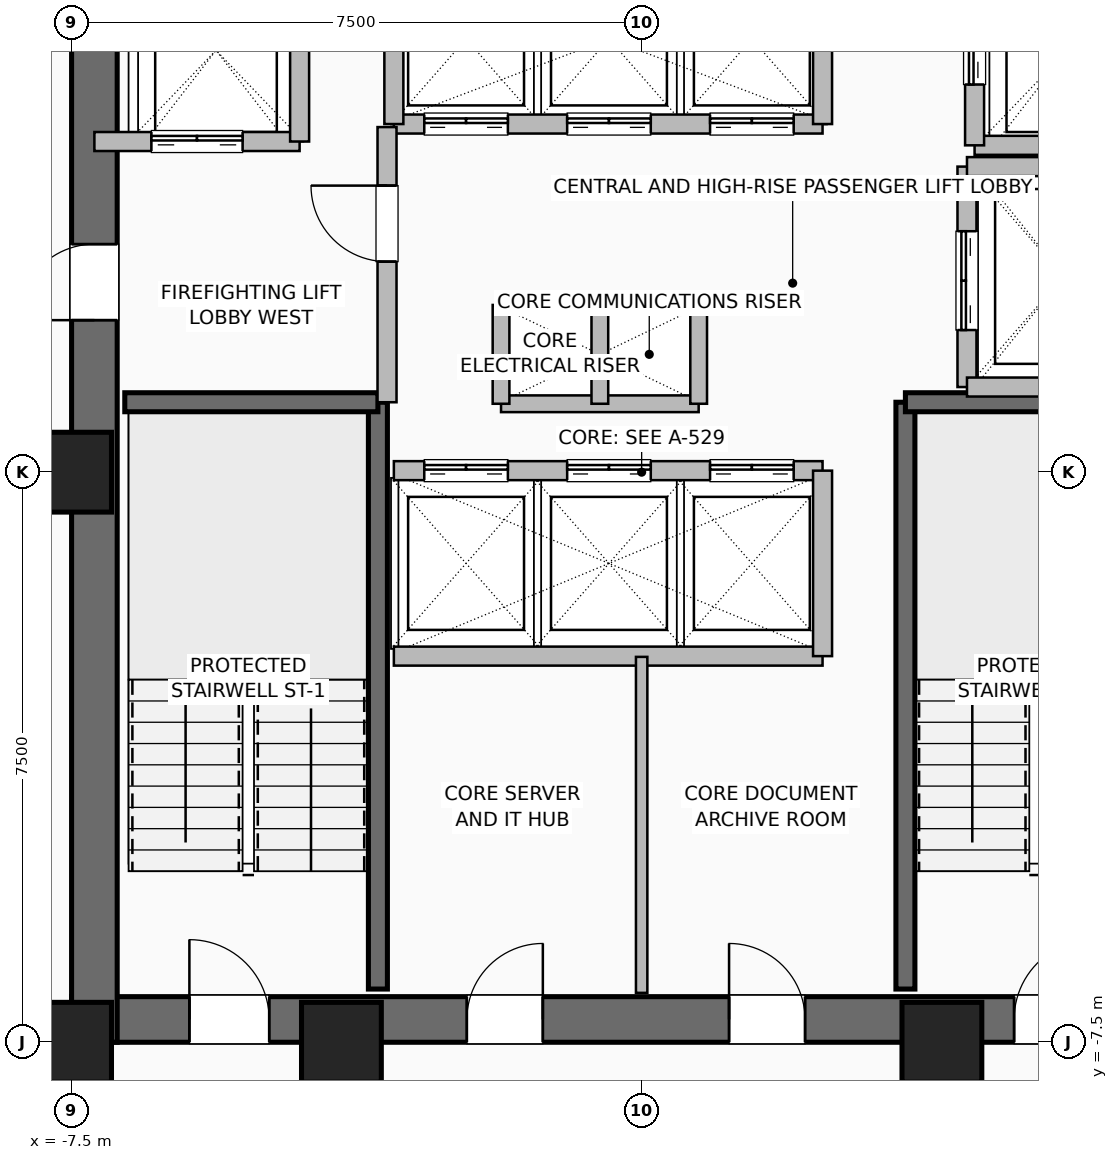
"""IFC4 building model, lengths in metres.
Left out: names, types, materials, properties, quantities, classifications, styles, units other than length and angle.
Written with IfcOpenShell. Run it as: python <this file> out.ifc"""

import sys

from ifc_helpers import new_model, si_unit, direction, frame, frame_2d, origin, origin_2d, place, context, subcontext, project, spatial, rectangle, hollow_rectangle, extrude, element, fill, save


model = new_model("IFC4")
c1 = context("Model", 3, precision=1e-05, world=origin(), true_north=direction((0.0, 1.0)))
c2 = subcontext(c1, "Body", "Model", "MODEL_VIEW")
j1 = project(units=[si_unit("LENGTHUNIT", "METRE"), si_unit("PLANEANGLEUNIT", "RADIAN")], contexts=[c1])
p1 = place(None, origin())
s1 = spatial("IfcSite", under=j1, at=p1, CompositionType="ELEMENT")
p2 = place(p1, origin())
s2 = spatial("IfcBuilding", under=s1, at=p2, CompositionType="ELEMENT")
p3 = place(p2, frame((0.0, 0.0, 112.0)))
s3 = spatial("IfcBuildingStorey", under=s2, at=p3, CompositionType="ELEMENT", Elevation=112.0)
for number, where, z_axis, x_axis in (
    (1, (-7.5, -7.5, 0.0), (0.0, 0.0, 1.0), (1.0, 0.0, 0.0)),
    (2, (-3.95, -7.5, 0.0), (0.0, 0.0, 1.0), (1.0, 0.0, 0.0)),
    (3, (3.95, -7.5, 0.0), (0.0, 0.0, 1.0), (1.0, 0.0, 0.0)),
    (4, (-7.5, 0.0, 0.0), (0.0, 0.0, 1.0), (1.0, 0.0, 0.0)),
):
    element("IfcColumn", number, at=place(p3, frame(where, z_axis=z_axis, x_axis=x_axis)), inside=s3, PredefinedType="COLUMN", context=c2, shape_type="SweptSolid", body=[
        extrude(hollow_rectangle(XDim=1.05, YDim=1.05, WallThickness=0.05, at=origin_2d()), origin(), (0.0, 0.0, 1.0), 3.6),
    ])
p4 = place(p3, frame((-7.5, -7.2, 0.0), z_axis=(0.0, 0.0, 1.0), x_axis=(1.0, 0.0, 0.0)))
e5 = element("IfcWall", 5, at=p4, inside=s3, PredefinedType="SHEAR", context=c2, shape_type="SweptSolid", body=[
    extrude(rectangle(XDim=15.0, YDim=0.6, at=frame_2d((7.5, 0.0))), origin(), (0.0, 0.0, 1.0), 3.36),
])
p5 = place(p4, frame((1.55, 0.0, 0.0)))
e6 = element("IfcOpeningElement", 6, at=p5, cuts=e5, PredefinedType="OPENING", context=c2, shape_type="SweptSolid", body=[
    extrude(rectangle(XDim=1.05, YDim=2.08, at=frame_2d((0.525, 1.04))), frame((0.0, 0.31, 0.0), z_axis=(0.0, -1.0, 0.0), x_axis=(1.0, 0.0, 0.0)), (0.0, 0.0, 1.0), 0.62),
])
p6 = place(p4, frame((12.4, 0.0, 0.0)))
e7 = element("IfcOpeningElement", 7, at=p6, cuts=e5, PredefinedType="OPENING", context=c2, shape_type="SweptSolid", body=[
    extrude(rectangle(XDim=1.05, YDim=2.08, at=frame_2d((0.525, 1.04))), frame((0.0, 0.31, 0.0), z_axis=(0.0, -1.0, 0.0), x_axis=(1.0, 0.0, 0.0)), (0.0, 0.0, 1.0), 0.62),
])
p7 = place(p4, frame((5.2, 0.0, 0.0)))
e8 = element("IfcOpeningElement", 8, at=p7, cuts=e5, PredefinedType="OPENING", context=c2, shape_type="SweptSolid", body=[
    extrude(rectangle(XDim=1.0, YDim=2.08, at=frame_2d((0.5, 1.04))), frame((0.0, 0.31, 0.0), z_axis=(0.0, -1.0, 0.0), x_axis=(1.0, 0.0, 0.0)), (0.0, 0.0, 1.0), 0.62),
])
p8 = place(p4, frame((8.65, 0.0, 0.0)))
e9 = element("IfcOpeningElement", 9, at=p8, cuts=e5, PredefinedType="OPENING", context=c2, shape_type="SweptSolid", body=[
    extrude(rectangle(XDim=1.0, YDim=2.08, at=frame_2d((0.5, 1.04))), frame((0.0, 0.31, 0.0), z_axis=(0.0, -1.0, 0.0), x_axis=(1.0, 0.0, 0.0)), (0.0, 0.0, 1.0), 0.62),
])
p9 = place(p3, frame((-7.2, -7.5, 0.0), z_axis=(0.0, 0.0, 1.0), x_axis=(0.0, 1.0, 0.0)))
e10 = element("IfcWall", 10, at=p9, inside=s3, PredefinedType="SHEAR", context=c2, shape_type="SweptSolid", body=[
    extrude(rectangle(XDim=15.0, YDim=0.6, at=frame_2d((7.5, 0.0))), origin(), (0.0, 0.0, 1.0), 3.36),
])
p10 = place(p9, frame((9.5, 0.0, 0.0)))
e11 = element("IfcOpeningElement", 11, at=p10, cuts=e10, PredefinedType="OPENING", context=c2, shape_type="SweptSolid", body=[
    extrude(rectangle(XDim=1.0, YDim=2.08, at=frame_2d((0.5, 1.04))), frame((0.0, 0.31, 0.0), z_axis=(0.0, -1.0, 0.0), x_axis=(1.0, 0.0, 0.0)), (0.0, 0.0, 1.0), 0.62),
])
p11 = place(p3, frame((-3.47, -6.8, 0.0), z_axis=(0.0, 0.0, 1.0), x_axis=(0.0, 1.0, 0.0)))
e12 = element("IfcWall", 12, at=p11, inside=s3, PredefinedType="SHEAR", context=c2, shape_type="SweptSolid", body=[
    extrude(rectangle(XDim=7.72, YDim=0.25, at=frame_2d((3.86, 0.0))), origin(), (0.0, 0.0, 1.0), 3.36),
])
p12 = place(p3, frame((-6.8, 0.92, 0.0), z_axis=(0.0, 0.0, 1.0), x_axis=(1.0, 0.0, 0.0)))
e13 = element("IfcWall", 13, at=p12, inside=s3, PredefinedType="SHEAR", context=c2, shape_type="SweptSolid", body=[
    extrude(rectangle(XDim=3.33, YDim=0.25, at=frame_2d((1.665, 0.0))), origin(), (0.0, 0.0, 1.0), 3.36),
])
p13 = place(p3, frame((3.47, -6.8, 0.0), z_axis=(0.0, 0.0, 1.0), x_axis=(0.0, 1.0, 0.0)))
e14 = element("IfcWall", 14, at=p13, inside=s3, PredefinedType="SHEAR", context=c2, shape_type="SweptSolid", body=[
    extrude(rectangle(XDim=7.72, YDim=0.25, at=frame_2d((3.86, 0.0))), origin(), (0.0, 0.0, 1.0), 3.36),
])
p14 = place(p3, frame((3.47, 0.92, 0.0), z_axis=(0.0, 0.0, 1.0), x_axis=(1.0, 0.0, 0.0)))
e15 = element("IfcWall", 15, at=p14, inside=s3, PredefinedType="SHEAR", context=c2, shape_type="SweptSolid", body=[
    extrude(rectangle(XDim=3.33, YDim=0.25, at=frame_2d((1.665, 0.0))), origin(), (0.0, 0.0, 1.0), 3.36),
])
for number, where, z_axis, x_axis in (
    (16, (-1.85, 2.2, 0.0), (0.0, 0.0, 1.0), (1.0, 0.0, 0.0)),
    (17, (-1.85, 0.9, 0.0), (0.0, 0.0, 1.0), (1.0, 0.0, 0.0)),
):
    element("IfcWall", number, at=place(p3, frame(where, z_axis=z_axis, x_axis=x_axis)), inside=s3, PredefinedType="PARTITIONING", context=c2, shape_type="SweptSolid", body=[
        extrude(rectangle(XDim=2.6, YDim=0.22, at=frame_2d((1.3, 0.0))), origin(), (0.0, 0.0, 1.0), 3.36),
    ])
for number, where, z_axis, x_axis in (
    (18, (-0.55, 0.9, 0.0), (0.0, 0.0, 1.0), (0.0, 1.0, 0.0)),
    (19, (0.75, 0.9, 0.0), (0.0, 0.0, 1.0), (0.0, 1.0, 0.0)),
    (20, (-1.85, 0.9, 0.0), (0.0, 0.0, 1.0), (0.0, 1.0, 0.0)),
):
    element("IfcWall", number, at=place(p3, frame(where, z_axis=z_axis, x_axis=x_axis)), inside=s3, PredefinedType="PARTITIONING", context=c2, shape_type="SweptSolid", body=[
        extrude(rectangle(XDim=1.3, YDim=0.22, at=frame_2d((0.65, 0.0))), origin(), (0.0, 0.0, 1.0), 3.36),
    ])
p15 = place(p3, frame((-3.26, 0.02, 0.0), z_axis=(0.0, 0.0, 1.0), x_axis=(1.0, 0.0, 0.0)))
e21 = element("IfcWall", 21, at=p15, inside=s3, PredefinedType="SHEAR", context=c2, shape_type="SweptSolid", body=[
    extrude(rectangle(XDim=5.64, YDim=0.25, at=frame_2d((2.82, 0.0))), origin(), (0.0, 0.0, 1.0), 3.36),
])
p16 = place(p15, frame((0.4, 0.0, 0.0)))
e22 = element("IfcOpeningElement", 22, at=p16, cuts=e21, PredefinedType="OPENING", context=c2, shape_type="SweptSolid", body=[
    extrude(rectangle(XDim=1.1, YDim=2.2, at=frame_2d((0.55, 1.1))), frame((0.0, 0.135, 0.0), z_axis=(0.0, -1.0, 0.0), x_axis=(1.0, 0.0, 0.0)), (0.0, 0.0, 1.0), 0.27),
])
p17 = place(p15, frame((2.28, 0.0, 0.0)))
e23 = element("IfcOpeningElement", 23, at=p17, cuts=e21, PredefinedType="OPENING", context=c2, shape_type="SweptSolid", body=[
    extrude(rectangle(XDim=1.1, YDim=2.2, at=frame_2d((0.55, 1.1))), frame((0.0, 0.135, 0.0), z_axis=(0.0, -1.0, 0.0), x_axis=(1.0, 0.0, 0.0)), (0.0, 0.0, 1.0), 0.27),
])
p18 = place(p15, frame((4.16, 0.0, 0.0)))
e24 = element("IfcOpeningElement", 24, at=p18, cuts=e21, PredefinedType="OPENING", context=c2, shape_type="SweptSolid", body=[
    extrude(rectangle(XDim=1.1, YDim=2.2, at=frame_2d((0.55, 1.1))), frame((0.0, 0.135, 0.0), z_axis=(0.0, -1.0, 0.0), x_axis=(1.0, 0.0, 0.0)), (0.0, 0.0, 1.0), 0.27),
])
p19 = place(p3, frame((-3.26, -2.42, 0.0), z_axis=(0.0, 0.0, 1.0), x_axis=(1.0, 0.0, 0.0)))
e25 = element("IfcWall", 25, at=p19, inside=s3, PredefinedType="SHEAR", context=c2, shape_type="SweptSolid", body=[
    extrude(rectangle(XDim=5.64, YDim=0.25, at=frame_2d((2.82, 0.0))), origin(), (0.0, 0.0, 1.0), 3.36),
])
p20 = place(p3, frame((2.38, -2.42, 0.0), z_axis=(0.0, 0.0, 1.0), x_axis=(0.0, 1.0, 0.0)))
e26 = element("IfcWall", 26, at=p20, inside=s3, PredefinedType="SHEAR", context=c2, shape_type="SweptSolid", body=[
    extrude(rectangle(XDim=2.44, YDim=0.25, at=frame_2d((1.22, 0.0))), origin(), (0.0, 0.0, 1.0), 3.36),
])
p21 = place(p3, frame((-3.26, 4.58, 0.0), z_axis=(0.0, 0.0, 1.0), x_axis=(1.0, 0.0, 0.0)))
e27 = element("IfcWall", 27, at=p21, inside=s3, PredefinedType="SHEAR", context=c2, shape_type="SweptSolid", body=[
    extrude(rectangle(XDim=5.64, YDim=0.25, at=frame_2d((2.82, 0.0))), origin(), (0.0, 0.0, 1.0), 3.36),
])
p22 = place(p21, frame((0.4, 0.0, 0.0)))
e28 = element("IfcOpeningElement", 28, at=p22, cuts=e27, PredefinedType="OPENING", context=c2, shape_type="SweptSolid", body=[
    extrude(rectangle(XDim=1.1, YDim=2.2, at=frame_2d((0.55, 1.1))), frame((0.0, 0.135, 0.0), z_axis=(0.0, -1.0, 0.0), x_axis=(1.0, 0.0, 0.0)), (0.0, 0.0, 1.0), 0.27),
])
p23 = place(p21, frame((2.28, 0.0, 0.0)))
e29 = element("IfcOpeningElement", 29, at=p23, cuts=e27, PredefinedType="OPENING", context=c2, shape_type="SweptSolid", body=[
    extrude(rectangle(XDim=1.1, YDim=2.2, at=frame_2d((0.55, 1.1))), frame((0.0, 0.135, 0.0), z_axis=(0.0, -1.0, 0.0), x_axis=(1.0, 0.0, 0.0)), (0.0, 0.0, 1.0), 0.27),
])
p24 = place(p21, frame((4.16, 0.0, 0.0)))
e30 = element("IfcOpeningElement", 30, at=p24, cuts=e27, PredefinedType="OPENING", context=c2, shape_type="SweptSolid", body=[
    extrude(rectangle(XDim=1.1, YDim=2.2, at=frame_2d((0.55, 1.1))), frame((0.0, 0.135, 0.0), z_axis=(0.0, -1.0, 0.0), x_axis=(1.0, 0.0, 0.0)), (0.0, 0.0, 1.0), 0.27),
])
for number, where, z_axis, x_axis in (
    (31, (-3.26, 4.58, 0.0), (0.0, 0.0, 1.0), (0.0, 1.0, 0.0)),
    (32, (2.38, 4.58, 0.0), (0.0, 0.0, 1.0), (0.0, 1.0, 0.0)),
):
    element("IfcWall", number, at=place(p3, frame(where, z_axis=z_axis, x_axis=x_axis)), inside=s3, PredefinedType="SHEAR", context=c2, shape_type="SweptSolid", body=[
        extrude(rectangle(XDim=2.22, YDim=0.25, at=frame_2d((1.11, 0.0))), origin(), (0.0, 0.0, 1.0), 3.36),
    ])
p25 = place(p3, frame((-7.2, 4.35, 0.0), z_axis=(0.0, 0.0, 1.0), x_axis=(1.0, 0.0, 0.0)))
e33 = element("IfcWall", 33, at=p25, inside=s3, PredefinedType="SHEAR", context=c2, shape_type="SweptSolid", body=[
    extrude(rectangle(XDim=2.7, YDim=0.25, at=frame_2d((1.35, 0.0))), origin(), (0.0, 0.0, 1.0), 3.36),
])
p26 = place(p25, frame((0.75, 0.0, 0.0)))
e34 = element("IfcOpeningElement", 34, at=p26, cuts=e33, PredefinedType="OPENING", context=c2, shape_type="SweptSolid", body=[
    extrude(rectangle(XDim=1.2, YDim=2.2, at=frame_2d((0.6, 1.1))), frame((0.0, 0.135, 0.0), z_axis=(0.0, -1.0, 0.0), x_axis=(1.0, 0.0, 0.0)), (0.0, 0.0, 1.0), 0.27),
])
p27 = place(p3, frame((-4.5, 4.35, 0.0), z_axis=(0.0, 0.0, 1.0), x_axis=(0.0, 1.0, 0.0)))
e35 = element("IfcWall", 35, at=p27, inside=s3, PredefinedType="SHEAR", context=c2, shape_type="SweptSolid", body=[
    extrude(rectangle(XDim=2.85, YDim=0.25, at=frame_2d((1.425, 0.0))), origin(), (0.0, 0.0, 1.0), 3.36),
])
p28 = place(p3, frame((4.38, 4.3, 0.0), z_axis=(0.0, 0.0, 1.0), x_axis=(1.0, 0.0, 0.0)))
e36 = element("IfcWall", 36, at=p28, inside=s3, PredefinedType="SHEAR", context=c2, shape_type="SweptSolid", body=[
    extrude(rectangle(XDim=2.42, YDim=0.25, at=frame_2d((1.21, 0.0))), origin(), (0.0, 0.0, 1.0), 3.36),
])
p29 = place(p3, frame((4.38, 4.3, 0.0), z_axis=(0.0, 0.0, 1.0), x_axis=(0.0, 1.0, 0.0)))
e37 = element("IfcWall", 37, at=p29, inside=s3, PredefinedType="SHEAR", context=c2, shape_type="SweptSolid", body=[
    extrude(rectangle(XDim=2.5, YDim=0.25, at=frame_2d((1.25, 0.0))), origin(), (0.0, 0.0, 1.0), 3.36),
])
p30 = place(p29, frame((0.8, 0.0, 0.0)))
e38 = element("IfcOpeningElement", 38, at=p30, cuts=e37, PredefinedType="OPENING", context=c2, shape_type="SweptSolid", body=[
    extrude(rectangle(XDim=1.2, YDim=2.2, at=frame_2d((0.6, 1.1))), frame((0.0, 0.135, 0.0), z_axis=(0.0, -1.0, 0.0), x_axis=(1.0, 0.0, 0.0)), (0.0, 0.0, 1.0), 0.27),
])
p31 = place(p3, frame((4.28, 1.12, 0.0), z_axis=(0.0, 0.0, 1.0), x_axis=(0.0, 1.0, 0.0)))
e39 = element("IfcWall", 39, at=p31, inside=s3, PredefinedType="SHEAR", context=c2, shape_type="SweptSolid", body=[
    extrude(rectangle(XDim=2.9, YDim=0.25, at=frame_2d((1.45, 0.0))), origin(), (0.0, 0.0, 1.0), 3.36),
])
p32 = place(p31, frame((0.75, 0.0, 0.0)))
e40 = element("IfcOpeningElement", 40, at=p32, cuts=e39, PredefinedType="OPENING", context=c2, shape_type="SweptSolid", body=[
    extrude(rectangle(XDim=1.3, YDim=2.3, at=frame_2d((0.65, 1.15))), frame((0.0, 0.135, 0.0), z_axis=(0.0, -1.0, 0.0), x_axis=(1.0, 0.0, 0.0)), (0.0, 0.0, 1.0), 0.27),
])
for number, where, z_axis, x_axis in (
    (41, (4.28, 1.12, 0.0), (0.0, 0.0, 1.0), (1.0, 0.0, 0.0)),
    (42, (4.28, 4.02, 0.0), (0.0, 0.0, 1.0), (1.0, 0.0, 0.0)),
):
    element("IfcWall", number, at=place(p3, frame(where, z_axis=z_axis, x_axis=x_axis)), inside=s3, PredefinedType="SHEAR", context=c2, shape_type="SweptSolid", body=[
        extrude(rectangle(XDim=2.52, YDim=0.25, at=frame_2d((1.26, 0.0))), origin(), (0.0, 0.0, 1.0), 3.36),
    ])
p33 = place(p3, frame((-3.35, 0.92, 0.0), z_axis=(0.0, 0.0, 1.0), x_axis=(0.0, 1.0, 0.0)))
e43 = element("IfcWall", 43, at=p33, inside=s3, PredefinedType="SHEAR", context=c2, shape_type="SweptSolid", body=[
    extrude(rectangle(XDim=3.62, YDim=0.25, at=frame_2d((1.81, 0.0))), origin(), (0.0, 0.0, 1.0), 3.36),
])
p34 = place(p33, frame((1.85, 0.0, 0.0)))
e44 = element("IfcOpeningElement", 44, at=p34, cuts=e43, PredefinedType="OPENING", context=c2, shape_type="SweptSolid", body=[
    extrude(rectangle(XDim=1.0, YDim=2.08, at=frame_2d((0.5, 1.04))), frame((0.0, 0.135, 0.0), z_axis=(0.0, -1.0, 0.0), x_axis=(1.0, 0.0, 0.0)), (0.0, 0.0, 1.0), 0.27),
])
p35 = place(p3, frame((0.0, -6.85, 0.0), z_axis=(0.0, 0.0, 1.0), x_axis=(0.0, 1.0, 0.0)))
e45 = element("IfcWall", 45, at=p35, inside=s3, PredefinedType="PARTITIONING", context=c2, shape_type="SweptSolid", body=[
    extrude(rectangle(XDim=4.42, YDim=0.15, at=frame_2d((2.21, 0.0))), origin(), (0.0, 0.0, 1.0), 3.36),
])
p36 = place(p5, origin())
e46 = element("IfcDoor", 46, at=p36, inside=s3, OperationType="SINGLE_SWING_LEFT", PredefinedType="DOOR", context=c2, shape_type="SweptSolid", body=[
    extrude(rectangle(XDim=1.05, YDim=2.08, at=frame_2d((0.525, 1.04))), frame((0.0, 0.025, 0.0), z_axis=(0.0, -1.0, 0.0), x_axis=(1.0, 0.0, 0.0)), (0.0, 0.0, 1.0), 0.05),
])
fill(e6, e46)
p37 = place(p6, origin())
e47 = element("IfcDoor", 47, at=p37, inside=s3, OperationType="SINGLE_SWING_RIGHT", PredefinedType="DOOR", context=c2, shape_type="SweptSolid", body=[
    extrude(rectangle(XDim=1.05, YDim=2.08, at=frame_2d((0.525, 1.04))), frame((0.0, 0.025, 0.0), z_axis=(0.0, -1.0, 0.0), x_axis=(1.0, 0.0, 0.0)), (0.0, 0.0, 1.0), 0.05),
])
fill(e7, e47)
p38 = place(p10, origin())
e48 = element("IfcDoor", 48, at=p38, inside=s3, OperationType="SINGLE_SWING_LEFT", PredefinedType="DOOR", context=c2, shape_type="SweptSolid", body=[
    extrude(rectangle(XDim=1.0, YDim=2.08, at=frame_2d((0.5, 1.04))), frame((0.0, 0.025, 0.0), z_axis=(0.0, -1.0, 0.0), x_axis=(1.0, 0.0, 0.0)), (0.0, 0.0, 1.0), 0.05),
])
fill(e11, e48)
p39 = place(p7, origin())
e49 = element("IfcDoor", 49, at=p39, inside=s3, OperationType="SINGLE_SWING_RIGHT", PredefinedType="DOOR", context=c2, shape_type="SweptSolid", body=[
    extrude(rectangle(XDim=1.0, YDim=2.08, at=frame_2d((0.5, 1.04))), frame((0.0, 0.025, 0.0), z_axis=(0.0, -1.0, 0.0), x_axis=(1.0, 0.0, 0.0)), (0.0, 0.0, 1.0), 0.05),
])
fill(e8, e49)
p40 = place(p8, origin())
e50 = element("IfcDoor", 50, at=p40, inside=s3, OperationType="SINGLE_SWING_LEFT", PredefinedType="DOOR", context=c2, shape_type="SweptSolid", body=[
    extrude(rectangle(XDim=1.0, YDim=2.08, at=frame_2d((0.5, 1.04))), frame((0.0, 0.025, 0.0), z_axis=(0.0, -1.0, 0.0), x_axis=(1.0, 0.0, 0.0)), (0.0, 0.0, 1.0), 0.05),
])
fill(e9, e50)
p41 = place(p16, origin())
e51 = element("IfcDoor", 51, at=p41, inside=s3, OperationType="DOUBLE_DOOR_SLIDING", PredefinedType="DOOR", context=c2, shape_type="SweptSolid", body=[
    extrude(rectangle(XDim=1.1, YDim=2.2, at=frame_2d((0.55, 1.1))), frame((0.0, 0.025, 0.0), z_axis=(0.0, -1.0, 0.0), x_axis=(1.0, 0.0, 0.0)), (0.0, 0.0, 1.0), 0.05),
])
fill(e22, e51)
p42 = place(p17, origin())
e52 = element("IfcDoor", 52, at=p42, inside=s3, OperationType="DOUBLE_DOOR_SLIDING", PredefinedType="DOOR", context=c2, shape_type="SweptSolid", body=[
    extrude(rectangle(XDim=1.1, YDim=2.2, at=frame_2d((0.55, 1.1))), frame((0.0, 0.025, 0.0), z_axis=(0.0, -1.0, 0.0), x_axis=(1.0, 0.0, 0.0)), (0.0, 0.0, 1.0), 0.05),
])
fill(e23, e52)
p43 = place(p18, origin())
e53 = element("IfcDoor", 53, at=p43, inside=s3, OperationType="DOUBLE_DOOR_SLIDING", PredefinedType="DOOR", context=c2, shape_type="SweptSolid", body=[
    extrude(rectangle(XDim=1.1, YDim=2.2, at=frame_2d((0.55, 1.1))), frame((0.0, 0.025, 0.0), z_axis=(0.0, -1.0, 0.0), x_axis=(1.0, 0.0, 0.0)), (0.0, 0.0, 1.0), 0.05),
])
fill(e24, e53)
p44 = place(p22, origin())
e54 = element("IfcDoor", 54, at=p44, inside=s3, OperationType="DOUBLE_DOOR_SLIDING", PredefinedType="DOOR", context=c2, shape_type="SweptSolid", body=[
    extrude(rectangle(XDim=1.1, YDim=2.2, at=frame_2d((0.55, 1.1))), frame((0.0, 0.025, 0.0), z_axis=(0.0, -1.0, 0.0), x_axis=(1.0, 0.0, 0.0)), (0.0, 0.0, 1.0), 0.05),
])
fill(e28, e54)
p45 = place(p23, origin())
e55 = element("IfcDoor", 55, at=p45, inside=s3, OperationType="DOUBLE_DOOR_SLIDING", PredefinedType="DOOR", context=c2, shape_type="SweptSolid", body=[
    extrude(rectangle(XDim=1.1, YDim=2.2, at=frame_2d((0.55, 1.1))), frame((0.0, 0.025, 0.0), z_axis=(0.0, -1.0, 0.0), x_axis=(1.0, 0.0, 0.0)), (0.0, 0.0, 1.0), 0.05),
])
fill(e29, e55)
p46 = place(p24, origin())
e56 = element("IfcDoor", 56, at=p46, inside=s3, OperationType="DOUBLE_DOOR_SLIDING", PredefinedType="DOOR", context=c2, shape_type="SweptSolid", body=[
    extrude(rectangle(XDim=1.1, YDim=2.2, at=frame_2d((0.55, 1.1))), frame((0.0, 0.025, 0.0), z_axis=(0.0, -1.0, 0.0), x_axis=(1.0, 0.0, 0.0)), (0.0, 0.0, 1.0), 0.05),
])
fill(e30, e56)
p47 = place(p26, origin())
e57 = element("IfcDoor", 57, at=p47, inside=s3, OperationType="DOUBLE_DOOR_SLIDING", PredefinedType="DOOR", context=c2, shape_type="SweptSolid", body=[
    extrude(rectangle(XDim=1.2, YDim=2.2, at=frame_2d((0.6, 1.1))), frame((0.0, 0.025, 0.0), z_axis=(0.0, -1.0, 0.0), x_axis=(1.0, 0.0, 0.0)), (0.0, 0.0, 1.0), 0.05),
])
fill(e34, e57)
p48 = place(p30, origin())
e58 = element("IfcDoor", 58, at=p48, inside=s3, OperationType="DOUBLE_DOOR_SLIDING", PredefinedType="DOOR", context=c2, shape_type="SweptSolid", body=[
    extrude(rectangle(XDim=1.2, YDim=2.2, at=frame_2d((0.6, 1.1))), frame((0.0, 0.025, 0.0), z_axis=(0.0, -1.0, 0.0), x_axis=(1.0, 0.0, 0.0)), (0.0, 0.0, 1.0), 0.05),
])
fill(e38, e58)
p49 = place(p32, origin())
e59 = element("IfcDoor", 59, at=p49, inside=s3, OperationType="DOUBLE_DOOR_SLIDING", PredefinedType="DOOR", context=c2, shape_type="SweptSolid", body=[
    extrude(rectangle(XDim=1.3, YDim=2.3, at=frame_2d((0.65, 1.15))), frame((0.0, 0.025, 0.0), z_axis=(0.0, -1.0, 0.0), x_axis=(1.0, 0.0, 0.0)), (0.0, 0.0, 1.0), 0.05),
])
fill(e40, e59)
p50 = place(p34, origin())
e60 = element("IfcDoor", 60, at=p50, inside=s3, OperationType="SINGLE_SWING_RIGHT", PredefinedType="DOOR", context=c2, shape_type="SweptSolid", body=[
    extrude(rectangle(XDim=1.0, YDim=2.08, at=frame_2d((0.5, 1.04))), frame((0.0, 0.025, 0.0), z_axis=(0.0, -1.0, 0.0), x_axis=(1.0, 0.0, 0.0)), (0.0, 0.0, 1.0), 0.05),
])
fill(e44, e60)
save(model, sys.argv[1])
